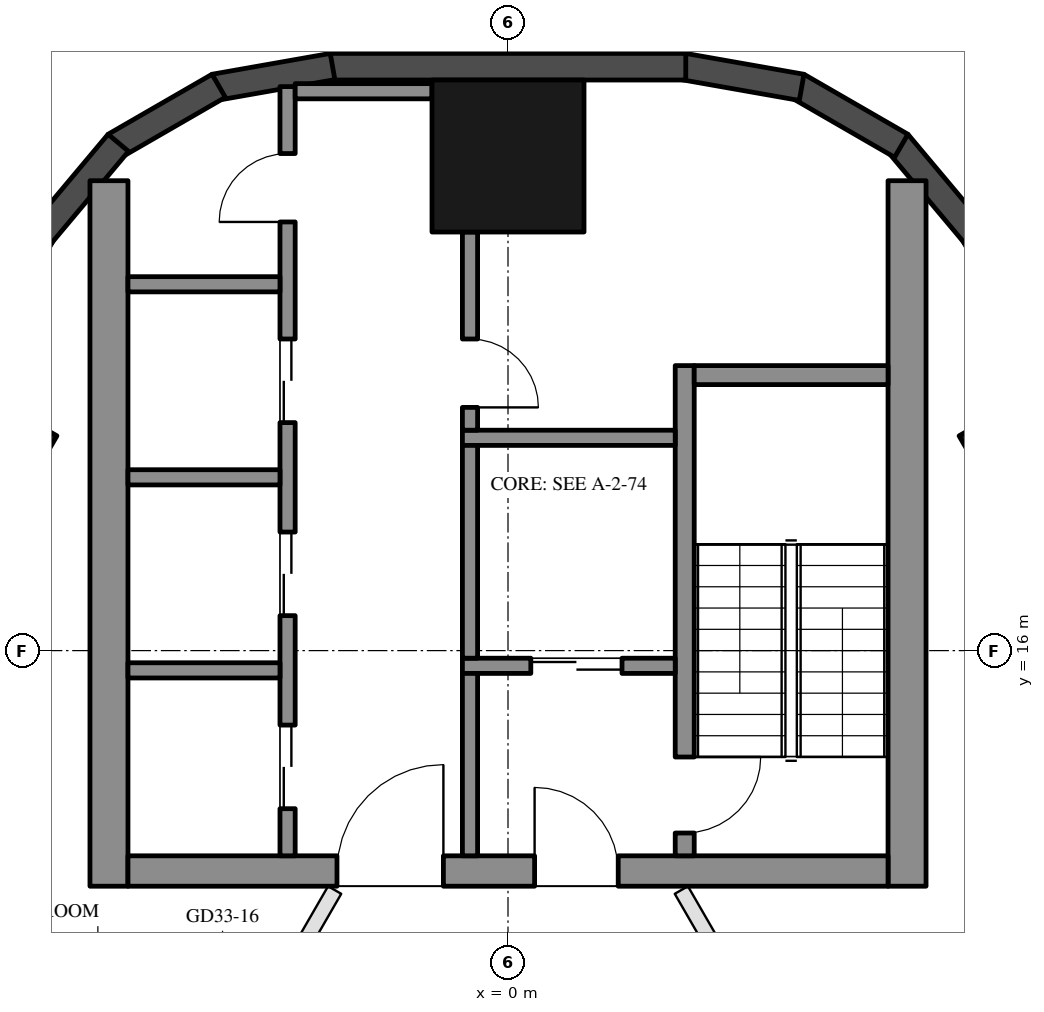
"""IFC4 building model, lengths in metres.
Left out: names, types, materials, properties, quantities, classifications, styles, units other than length and angle.
Written with IfcOpenShell. Run it as: python <this file> out.ifc"""

import sys

from ifc_helpers import new_model, si_unit, direction, frame, frame_2d, origin, origin_2d, place, context, subcontext, project, spatial, rectangle, hollow_rectangle, extrude, boolean, halfspace, element, fill, save


model = new_model("IFC4")
c1 = context("Model", 3, precision=1e-05, world=origin(), true_north=direction((0.0, 1.0)))
c2 = subcontext(c1, "Body", "Model", "MODEL_VIEW")
j1 = project(units=[si_unit("LENGTHUNIT", "METRE"), si_unit("PLANEANGLEUNIT", "RADIAN")], contexts=[c1])
p1 = place(None, origin())
s1 = spatial("IfcSite", under=j1, at=p1, CompositionType="ELEMENT")
p2 = place(p1, origin())
s2 = spatial("IfcBuilding", under=s1, at=p2, CompositionType="ELEMENT")
p3 = place(p2, frame((0.0, 0.0, 317.0)))
s3 = spatial("IfcBuildingStorey", under=s2, at=p3, CompositionType="ELEMENT", Elevation=317.0)
for number, where, z_axis, x_axis in (
    (1, (6.31, 18.725, 0.0), (0.0, 0.0, 1.0), (-0.5, 0.866, 0.0)),
    (2, (-6.31, 18.725, 0.0), (0.0, 0.0, 1.0), (0.5, 0.866, 0.0)),
):
    element("IfcColumn", number, at=place(p3, frame(where, z_axis=z_axis, x_axis=x_axis)), inside=s3, PredefinedType="COLUMN", context=c2, shape_type="SweptSolid", body=[
        boolean("DIFFERENCE", extrude(hollow_rectangle(XDim=0.55, YDim=0.55, WallThickness=0.025, at=origin_2d()), origin(), (0.0, 0.0, 1.0), 3.7), halfspace(frame((0.0, 0.0, 3.66), z_axis=(0.0, 0.0, 1.0), x_axis=(1.0, 0.0, 0.0)), False)),
    ])
p4 = place(p3, frame((0.0, 22.508, 0.0), z_axis=(0.0, 0.0, 1.0), x_axis=(1.0, 0.0, 0.0)))
e3 = element("IfcColumn", 3, at=p4, inside=s3, PredefinedType="COLUMN", context=c2, shape_type="SweptSolid", body=[
    boolean("DIFFERENCE", extrude(hollow_rectangle(XDim=2.0, YDim=2.0, WallThickness=0.05, at=origin_2d()), origin(), (0.0, 0.0, 1.0), 3.7), halfspace(frame((0.0, 0.0, 3.587), z_axis=(0.0, 0.0, 1.0), x_axis=(1.0, 0.0, 0.0)), False)),
])
p5 = place(p3, frame((-6.125, 21.497, 0.0), z_axis=(0.0, 0.0, 1.0), x_axis=(-0.500002137087, -0.866024169933, 0.0)))
e4 = element("IfcWall", 4, at=p5, inside=s3, PredefinedType="SOLIDWALL", context=c2, shape_type="SweptSolid", body=[
    extrude(rectangle(XDim=9.924, YDim=0.35, at=frame_2d((4.962, 0.0))), origin(), (0.0, 0.0, 1.0), 3.55),
])
p6 = place(p5, frame((0.381, 0.0, 0.3)))
e5 = element("IfcOpeningElement", 5, at=p6, cuts=e4, PredefinedType="OPENING", context=c2, shape_type="SweptSolid", body=[
    extrude(rectangle(XDim=1.4, YDim=2.65, at=frame_2d((0.7, 1.325))), frame((0.0, 0.185, 0.0), z_axis=(0.0, -1.0, 0.0), x_axis=(1.0, 0.0, 0.0)), (0.0, 0.0, 1.0), 0.37),
])
p7 = place(p5, frame((5.999, 0.0, 0.0)))
e6 = element("IfcOpeningElement", 6, at=p7, cuts=e4, PredefinedType="OPENING", context=c2, shape_type="SweptSolid", body=[
    extrude(rectangle(XDim=2.4, YDim=2.4, at=frame_2d((1.2, 1.2))), frame((0.0, 0.185, 0.0), z_axis=(0.0, -1.0, 0.0), x_axis=(1.0, 0.0, 0.0)), (0.0, 0.0, 1.0), 0.37),
])
p8 = place(p5, frame((3.118, 0.0, 0.3)))
e7 = element("IfcOpeningElement", 7, at=p8, cuts=e4, PredefinedType="OPENING", context=c2, shape_type="SweptSolid", body=[
    extrude(rectangle(XDim=2.5, YDim=2.65, at=frame_2d((1.25, 1.325))), frame((0.0, 0.185, 0.0), z_axis=(0.0, -1.0, 0.0), x_axis=(1.0, 0.0, 0.0)), (0.0, 0.0, 1.0), 0.37),
])
p9 = place(p3, frame((7.821, 18.558, 0.0), z_axis=(0.0, 0.0, 1.0), x_axis=(-0.500000656212, 0.86602502492, 0.0)))
e8 = element("IfcWall", 8, at=p9, inside=s3, PredefinedType="SOLIDWALL", context=c2, shape_type="SweptSolid", body=[
    extrude(rectangle(XDim=3.393, YDim=0.35, at=frame_2d((1.697, 0.0))), origin(), (0.0, 0.0, 1.0), 3.55),
])
p10 = place(p9, frame((1.525, 0.0, 0.3)))
e9 = element("IfcOpeningElement", 9, at=p10, cuts=e8, PredefinedType="OPENING", context=c2, shape_type="SweptSolid", body=[
    extrude(rectangle(XDim=1.4, YDim=2.65, at=frame_2d((0.7, 1.325))), frame((0.0, 0.185, 0.0), z_axis=(0.0, -1.0, 0.0), x_axis=(1.0, 0.0, 0.0)), (0.0, 0.0, 1.0), 0.37),
])
for number, where, z_axis, x_axis in (
    (10, (6.142, 21.472, 0.0), (0.0, 0.0, 1.0), (-0.643, 0.766, 0.0)),
    (11, (5.174, 22.642, 0.0), (0.0, 0.0, 1.0), (-0.866, 0.5, 0.0)),
):
    element("IfcWall", number, at=place(p3, frame(where, z_axis=z_axis, x_axis=x_axis)), inside=s3, PredefinedType="SOLIDWALL", context=c2, shape_type="SweptSolid", body=[
        extrude(rectangle(XDim=1.579, YDim=0.35, at=frame_2d((0.79, 0.0))), origin(), (0.0, 0.0, 1.0), 3.55),
    ])
p11 = place(p3, frame((3.863, 23.411, 0.0), z_axis=(0.0, 0.0, 1.0), x_axis=(-0.98478200219, 0.173794154571, 0.0)))
e12 = element("IfcWall", 12, at=p11, inside=s3, PredefinedType="SOLIDWALL", context=c2, shape_type="SweptSolid", body=[
    extrude(rectangle(XDim=1.579, YDim=0.35, at=frame_2d((0.79, 0.0))), origin(), (0.0, 0.0, 1.0), 3.55),
])
p12 = place(p3, frame((2.339, 23.683, 0.0), z_axis=(0.0, 0.0, 1.0), x_axis=(-1.0, 0.0, 0.0)))
e13 = element("IfcWall", 13, at=p12, inside=s3, PredefinedType="SOLIDWALL", context=c2, shape_type="SweptSolid", body=[
    extrude(rectangle(XDim=4.677, YDim=0.35, at=frame_2d((2.339, 0.0))), origin(), (0.0, 0.0, 1.0), 3.55),
])
p13 = place(p3, frame((-2.308, 23.685, 0.0), z_axis=(0.0, 0.0, 1.0), x_axis=(-0.98478200219, -0.173794154571, 0.0)))
e14 = element("IfcWall", 14, at=p13, inside=s3, PredefinedType="SOLIDWALL", context=c2, shape_type="SweptSolid", body=[
    extrude(rectangle(XDim=1.579, YDim=0.35, at=frame_2d((0.79, 0.0))), origin(), (0.0, 0.0, 1.0), 3.55),
])
for number, where, z_axis, x_axis in (
    (15, (-3.806, 23.432, 0.0), (0.0, 0.0, 1.0), (-0.866, -0.5, 0.0)),
    (16, (-5.127, 22.681, 0.0), (0.0, 0.0, 1.0), (-0.643, -0.766, 0.0)),
):
    element("IfcWall", number, at=place(p3, frame(where, z_axis=z_axis, x_axis=x_axis)), inside=s3, PredefinedType="SOLIDWALL", context=c2, shape_type="SweptSolid", body=[
        extrude(rectangle(XDim=1.579, YDim=0.35, at=frame_2d((0.79, 0.0))), origin(), (0.0, 0.0, 1.0), 3.55),
    ])
for number, where, z_axis, x_axis in (
    (17, (5.25, 12.9, 0.0), (0.0, 0.0, 1.0), (0.0, 1.0, 0.0)),
    (18, (-5.25, 12.9, 0.0), (0.0, 0.0, 1.0), (0.0, 1.0, 0.0)),
):
    element("IfcWall", number, at=place(p3, frame(where, z_axis=z_axis, x_axis=x_axis)), inside=s3, PredefinedType="SHEAR", context=c2, shape_type="SweptSolid", body=[
        extrude(rectangle(XDim=9.283, YDim=0.5, at=frame_2d((4.641, 0.0))), origin(), (0.0, 0.0, 1.0), 3.5),
    ])
p14 = place(p3, frame((5.0, 13.1, 0.0), z_axis=(0.0, 0.0, 1.0), x_axis=(-1.0, 0.0, 0.0)))
e19 = element("IfcWall", 19, at=p14, inside=s3, PredefinedType="SHEAR", context=c2, shape_type="SweptSolid", body=[
    extrude(rectangle(XDim=10.0, YDim=0.4, at=frame_2d((5.0, 0.0))), origin(), (0.0, 0.0, 1.0), 3.5),
])
p15 = place(p14, frame((3.55, 0.0, 0.0)))
e20 = element("IfcOpeningElement", 20, at=p15, cuts=e19, PredefinedType="OPENING", context=c2, shape_type="SweptSolid", body=[
    extrude(rectangle(XDim=1.1, YDim=2.1, at=frame_2d((0.55, 1.05))), frame((0.0, 0.21, 0.0), z_axis=(0.0, -1.0, 0.0), x_axis=(1.0, 0.0, 0.0)), (0.0, 0.0, 1.0), 0.42),
])
p16 = place(p14, frame((5.85, 0.0, 0.0)))
e21 = element("IfcOpeningElement", 21, at=p16, cuts=e19, PredefinedType="OPENING", context=c2, shape_type="SweptSolid", body=[
    extrude(rectangle(XDim=1.4, YDim=2.1, at=frame_2d((0.7, 1.05))), frame((0.0, 0.21, 0.0), z_axis=(0.0, -1.0, 0.0), x_axis=(1.0, 0.0, 0.0)), (0.0, 0.0, 1.0), 0.42),
])
p17 = place(p3, frame((2.325, 13.3, 0.0), z_axis=(0.0, 0.0, 1.0), x_axis=(0.0, 1.0, 0.0)))
e22 = element("IfcWall", 22, at=p17, inside=s3, PredefinedType="SHEAR", context=c2, shape_type="SweptSolid", body=[
    extrude(rectangle(XDim=6.45, YDim=0.25, at=frame_2d((3.225, 0.0))), origin(), (0.0, 0.0, 1.0), 3.5),
])
p18 = place(p17, frame((0.3, 0.0, 0.0)))
e23 = element("IfcOpeningElement", 23, at=p18, cuts=e22, PredefinedType="OPENING", context=c2, shape_type="SweptSolid", body=[
    extrude(rectangle(XDim=1.0, YDim=2.1, at=frame_2d((0.5, 1.05))), frame((0.0, 0.135, 0.0), z_axis=(0.0, -1.0, 0.0), x_axis=(1.0, 0.0, 0.0)), (0.0, 0.0, 1.0), 0.27),
])
p19 = place(p3, frame((5.0, 19.625, 0.0), z_axis=(0.0, 0.0, 1.0), x_axis=(-1.0, 0.0, 0.0)))
e24 = element("IfcWall", 24, at=p19, inside=s3, PredefinedType="SHEAR", context=c2, shape_type="SweptSolid", body=[
    extrude(rectangle(XDim=2.55, YDim=0.25, at=frame_2d((1.275, 0.0))), origin(), (0.0, 0.0, 1.0), 3.5),
])
p20 = place(p3, frame((2.2, 18.8, 0.0), z_axis=(0.0, 0.0, 1.0), x_axis=(-1.0, 0.0, 0.0)))
e25 = element("IfcWall", 25, at=p20, inside=s3, PredefinedType="SHEAR", context=c2, shape_type="SweptSolid", body=[
    extrude(rectangle(XDim=2.8, YDim=0.2, at=frame_2d((1.4, 0.0))), origin(), (0.0, 0.0, 1.0), 3.5),
])
p21 = place(p3, frame((2.2, 15.8, 0.0), z_axis=(0.0, 0.0, 1.0), x_axis=(-1.0, 0.0, 0.0)))
e26 = element("IfcWall", 26, at=p21, inside=s3, PredefinedType="SHEAR", context=c2, shape_type="SweptSolid", body=[
    extrude(rectangle(XDim=2.8, YDim=0.2, at=frame_2d((1.4, 0.0))), origin(), (0.0, 0.0, 1.0), 3.5),
])
p22 = place(p21, frame((0.7, 0.0, 0.0)))
e27 = element("IfcOpeningElement", 27, at=p22, cuts=e26, PredefinedType="OPENING", context=c2, shape_type="SweptSolid", body=[
    extrude(rectangle(XDim=1.2, YDim=2.1, at=frame_2d((0.6, 1.05))), frame((0.0, 0.11, 0.0), z_axis=(0.0, -1.0, 0.0), x_axis=(1.0, 0.0, 0.0)), (0.0, 0.0, 1.0), 0.22),
])
p23 = place(p3, frame((-0.5, 15.9, 0.0), z_axis=(0.0, 0.0, 1.0), x_axis=(0.0, 1.0, 0.0)))
e28 = element("IfcWall", 28, at=p23, inside=s3, PredefinedType="SHEAR", context=c2, shape_type="SweptSolid", body=[
    extrude(rectangle(XDim=2.8, YDim=0.2, at=frame_2d((1.4, 0.0))), origin(), (0.0, 0.0, 1.0), 3.5),
])
p24 = place(p3, frame((-0.5, 13.3, 0.0), z_axis=(0.0, 0.0, 1.0), x_axis=(0.0, 1.0, 0.0)))
e29 = element("IfcWall", 29, at=p24, inside=s3, PredefinedType="SHEAR", context=c2, shape_type="SweptSolid", body=[
    extrude(rectangle(XDim=2.4, YDim=0.2, at=frame_2d((1.2, 0.0))), origin(), (0.0, 0.0, 1.0), 3.5),
])
p25 = place(p3, frame((-2.9, 13.3, 0.0), z_axis=(0.0, 0.0, 1.0), x_axis=(0.0, 1.0, 0.0)))
e30 = element("IfcWall", 30, at=p25, inside=s3, PredefinedType="SHEAR", context=c2, shape_type="SweptSolid", body=[
    extrude(rectangle(XDim=10.121, YDim=0.2, at=frame_2d((5.061, 0.0))), origin(), (0.0, 0.0, 1.0), 3.5),
])
p26 = place(p25, frame((0.62, 0.0, 0.0)))
e31 = element("IfcOpeningElement", 31, at=p26, cuts=e30, PredefinedType="OPENING", context=c2, shape_type="SweptSolid", body=[
    extrude(rectangle(XDim=1.1, YDim=2.1, at=frame_2d((0.55, 1.05))), frame((0.0, 0.11, 0.0), z_axis=(0.0, -1.0, 0.0), x_axis=(1.0, 0.0, 0.0)), (0.0, 0.0, 1.0), 0.22),
])
p27 = place(p25, frame((3.16, 0.0, 0.0)))
e32 = element("IfcOpeningElement", 32, at=p27, cuts=e30, PredefinedType="OPENING", context=c2, shape_type="SweptSolid", body=[
    extrude(rectangle(XDim=1.1, YDim=2.1, at=frame_2d((0.55, 1.05))), frame((0.0, 0.11, 0.0), z_axis=(0.0, -1.0, 0.0), x_axis=(1.0, 0.0, 0.0)), (0.0, 0.0, 1.0), 0.22),
])
p28 = place(p25, frame((5.7, 0.0, 0.0)))
e33 = element("IfcOpeningElement", 33, at=p28, cuts=e30, PredefinedType="OPENING", context=c2, shape_type="SweptSolid", body=[
    extrude(rectangle(XDim=1.1, YDim=2.1, at=frame_2d((0.55, 1.05))), frame((0.0, 0.11, 0.0), z_axis=(0.0, -1.0, 0.0), x_axis=(1.0, 0.0, 0.0)), (0.0, 0.0, 1.0), 0.22),
])
p29 = place(p25, frame((8.34, 0.0, 0.0)))
e34 = element("IfcOpeningElement", 34, at=p29, cuts=e30, PredefinedType="OPENING", context=c2, shape_type="SweptSolid", body=[
    extrude(rectangle(XDim=0.9, YDim=2.1, at=frame_2d((0.45, 1.05))), frame((0.0, 0.11, 0.0), z_axis=(0.0, -1.0, 0.0), x_axis=(1.0, 0.0, 0.0)), (0.0, 0.0, 1.0), 0.22),
])
p30 = place(p3, frame((-1.0, 23.36, 0.0), z_axis=(0.0, 0.0, 1.0), x_axis=(-1.0, 0.0, 0.0)))
e35 = element("IfcWall", 35, at=p30, inside=s3, PredefinedType="SHEAR", context=c2, shape_type="SweptSolid", body=[
    extrude(rectangle(XDim=1.8, YDim=0.2, at=frame_2d((0.9, 0.0))), origin(), (0.0, 0.0, 1.0), 3.5),
])
p31 = place(p3, frame((-0.5, 18.9, 0.0), z_axis=(0.0, 0.0, 1.0), x_axis=(0.0, 1.0, 0.0)))
e36 = element("IfcWall", 36, at=p31, inside=s3, PredefinedType="SHEAR", context=c2, shape_type="SweptSolid", body=[
    extrude(rectangle(XDim=2.608, YDim=0.2, at=frame_2d((1.304, 0.0))), origin(), (0.0, 0.0, 1.0), 3.5),
])
p32 = place(p31, frame((0.3, 0.0, 0.0)))
e37 = element("IfcOpeningElement", 37, at=p32, cuts=e36, PredefinedType="OPENING", context=c2, shape_type="SweptSolid", body=[
    extrude(rectangle(XDim=0.9, YDim=2.1, at=frame_2d((0.45, 1.05))), frame((0.0, 0.11, 0.0), z_axis=(0.0, -1.0, 0.0), x_axis=(1.0, 0.0, 0.0)), (0.0, 0.0, 1.0), 0.22),
])
for number, where, z_axis, x_axis in (
    (38, (-3.0, 15.74, 0.0), (0.0, 0.0, 1.0), (-1.0, 0.0, 0.0)),
    (39, (-3.0, 18.28, 0.0), (0.0, 0.0, 1.0), (-1.0, 0.0, 0.0)),
    (40, (-3.0, 20.82, 0.0), (0.0, 0.0, 1.0), (-1.0, 0.0, 0.0)),
):
    element("IfcWall", number, at=place(p3, frame(where, z_axis=z_axis, x_axis=x_axis)), inside=s3, PredefinedType="SHEAR", context=c2, shape_type="SweptSolid", body=[
        extrude(rectangle(XDim=2.0, YDim=0.2, at=frame_2d((1.0, 0.0))), origin(), (0.0, 0.0, 1.0), 3.5),
    ])
p33 = place(p3, frame((2.281, 12.85, 0.0), z_axis=(0.0, 0.0, 1.0), x_axis=(0.500004836318, -0.866022611517, 0.0)))
e41 = element("IfcWall", 41, at=p33, inside=s3, PredefinedType="PARTITIONING", context=c2, shape_type="SweptSolid", body=[
    extrude(rectangle(XDim=5.488, YDim=0.2, at=frame_2d((2.744, 0.0))), origin(), (0.0, 0.0, 1.0), 3.1),
])
p34 = place(p33, frame((2.038, 0.0, 0.0)))
e42 = element("IfcOpeningElement", 42, at=p34, cuts=e41, PredefinedType="OPENING", context=c2, shape_type="SweptSolid", body=[
    extrude(rectangle(XDim=1.0, YDim=2.1, at=frame_2d((0.5, 1.05))), frame((0.0, 0.11, 0.0), z_axis=(0.0, -1.0, 0.0), x_axis=(1.0, 0.0, 0.0)), (0.0, 0.0, 1.0), 0.22),
])
p35 = place(p3, frame((-4.625, 8.79, 0.0), z_axis=(0.0, 0.0, 1.0), x_axis=(0.499964368059, 0.866045974918, 0.0)))
e43 = element("IfcWall", 43, at=p35, inside=s3, PredefinedType="PARTITIONING", context=c2, shape_type="SweptSolid", body=[
    extrude(rectangle(XDim=4.688, YDim=0.2, at=frame_2d((2.344, 0.0))), origin(), (0.0, 0.0, 1.0), 3.1),
])
p36 = place(p35, frame((2.45, 0.0, 0.0)))
e44 = element("IfcOpeningElement", 44, at=p36, cuts=e43, PredefinedType="OPENING", context=c2, shape_type="SweptSolid", body=[
    extrude(rectangle(XDim=1.0, YDim=2.1, at=frame_2d((0.5, 1.05))), frame((0.0, 0.11, 0.0), z_axis=(0.0, -1.0, 0.0), x_axis=(1.0, 0.0, 0.0)), (0.0, 0.0, 1.0), 0.22),
])
p37 = place(p22, origin())
e45 = element("IfcDoor", 45, at=p37, inside=s3, OperationType="DOUBLE_DOOR_SLIDING", PredefinedType="DOOR", context=c2, shape_type="SweptSolid", body=[
    extrude(rectangle(XDim=1.2, YDim=2.1, at=frame_2d((0.6, 1.05))), frame((0.0, 0.025, 0.0), z_axis=(0.0, -1.0, 0.0), x_axis=(1.0, 0.0, 0.0)), (0.0, 0.0, 1.0), 0.05),
])
fill(e27, e45)
p38 = place(p26, origin())
e46 = element("IfcDoor", 46, at=p38, inside=s3, OperationType="DOUBLE_DOOR_SLIDING", PredefinedType="DOOR", context=c2, shape_type="SweptSolid", body=[
    extrude(rectangle(XDim=1.1, YDim=2.1, at=frame_2d((0.55, 1.05))), frame((0.0, 0.025, 0.0), z_axis=(0.0, -1.0, 0.0), x_axis=(1.0, 0.0, 0.0)), (0.0, 0.0, 1.0), 0.05),
])
fill(e31, e46)
p39 = place(p27, origin())
e47 = element("IfcDoor", 47, at=p39, inside=s3, OperationType="DOUBLE_DOOR_SLIDING", PredefinedType="DOOR", context=c2, shape_type="SweptSolid", body=[
    extrude(rectangle(XDim=1.1, YDim=2.1, at=frame_2d((0.55, 1.05))), frame((0.0, 0.025, 0.0), z_axis=(0.0, -1.0, 0.0), x_axis=(1.0, 0.0, 0.0)), (0.0, 0.0, 1.0), 0.05),
])
fill(e32, e47)
p40 = place(p28, origin())
e48 = element("IfcDoor", 48, at=p40, inside=s3, OperationType="DOUBLE_DOOR_SLIDING", PredefinedType="DOOR", context=c2, shape_type="SweptSolid", body=[
    extrude(rectangle(XDim=1.1, YDim=2.1, at=frame_2d((0.55, 1.05))), frame((0.0, 0.025, 0.0), z_axis=(0.0, -1.0, 0.0), x_axis=(1.0, 0.0, 0.0)), (0.0, 0.0, 1.0), 0.05),
])
fill(e33, e48)
p41 = place(p29, origin())
e49 = element("IfcDoor", 49, at=p41, inside=s3, OperationType="SINGLE_SWING_LEFT", PredefinedType="DOOR", context=c2, shape_type="SweptSolid", body=[
    extrude(rectangle(XDim=0.9, YDim=2.1, at=frame_2d((0.45, 1.05))), frame((0.0, 0.025, 0.0), z_axis=(0.0, -1.0, 0.0), x_axis=(1.0, 0.0, 0.0)), (0.0, 0.0, 1.0), 0.05),
])
fill(e34, e49)
p42 = place(p32, frame((0.9, 0.0, 0.0), z_axis=(0.0, 0.0, 1.0), x_axis=(-1.0, 0.0, 0.0)))
e50 = element("IfcDoor", 50, at=p42, inside=s3, OperationType="SINGLE_SWING_RIGHT", PredefinedType="DOOR", context=c2, shape_type="SweptSolid", body=[
    extrude(rectangle(XDim=0.9, YDim=2.1, at=frame_2d((0.45, 1.05))), frame((0.0, 0.025, 0.0), z_axis=(0.0, -1.0, 0.0), x_axis=(1.0, 0.0, 0.0)), (0.0, 0.0, 1.0), 0.05),
])
fill(e37, e50)
p43 = place(p15, frame((1.1, 0.0, 0.0), z_axis=(0.0, 0.0, 1.0), x_axis=(-1.0, 0.0, 0.0)))
e51 = element("IfcDoor", 51, at=p43, inside=s3, OperationType="SINGLE_SWING_LEFT", PredefinedType="DOOR", context=c2, shape_type="SweptSolid", body=[
    extrude(rectangle(XDim=1.1, YDim=2.1, at=frame_2d((0.55, 1.05))), frame((0.0, 0.025, 0.0), z_axis=(0.0, -1.0, 0.0), x_axis=(1.0, 0.0, 0.0)), (0.0, 0.0, 1.0), 0.05),
])
fill(e20, e51)
p44 = place(p16, frame((1.4, 0.0, 0.0), z_axis=(0.0, 0.0, 1.0), x_axis=(-1.0, 0.0, 0.0)))
e52 = element("IfcDoor", 52, at=p44, inside=s3, OperationType="DOUBLE_DOOR_SINGLE_SWING", PredefinedType="DOOR", context=c2, shape_type="SweptSolid", body=[
    extrude(rectangle(XDim=1.4, YDim=2.1, at=frame_2d((0.7, 1.05))), frame((0.0, 0.025, 0.0), z_axis=(0.0, -1.0, 0.0), x_axis=(1.0, 0.0, 0.0)), (0.0, 0.0, 1.0), 0.05),
])
fill(e21, e52)
p45 = place(p18, frame((1.0, 0.0, 0.0), z_axis=(0.0, 0.0, 1.0), x_axis=(-1.0, 0.0, 0.0)))
e53 = element("IfcDoor", 53, at=p45, inside=s3, OperationType="SINGLE_SWING_LEFT", PredefinedType="DOOR", context=c2, shape_type="SweptSolid", body=[
    extrude(rectangle(XDim=1.0, YDim=2.1, at=frame_2d((0.5, 1.05))), frame((0.0, 0.025, 0.0), z_axis=(0.0, -1.0, 0.0), x_axis=(1.0, 0.0, 0.0)), (0.0, 0.0, 1.0), 0.05),
])
fill(e23, e53)
save(model, sys.argv[1])
